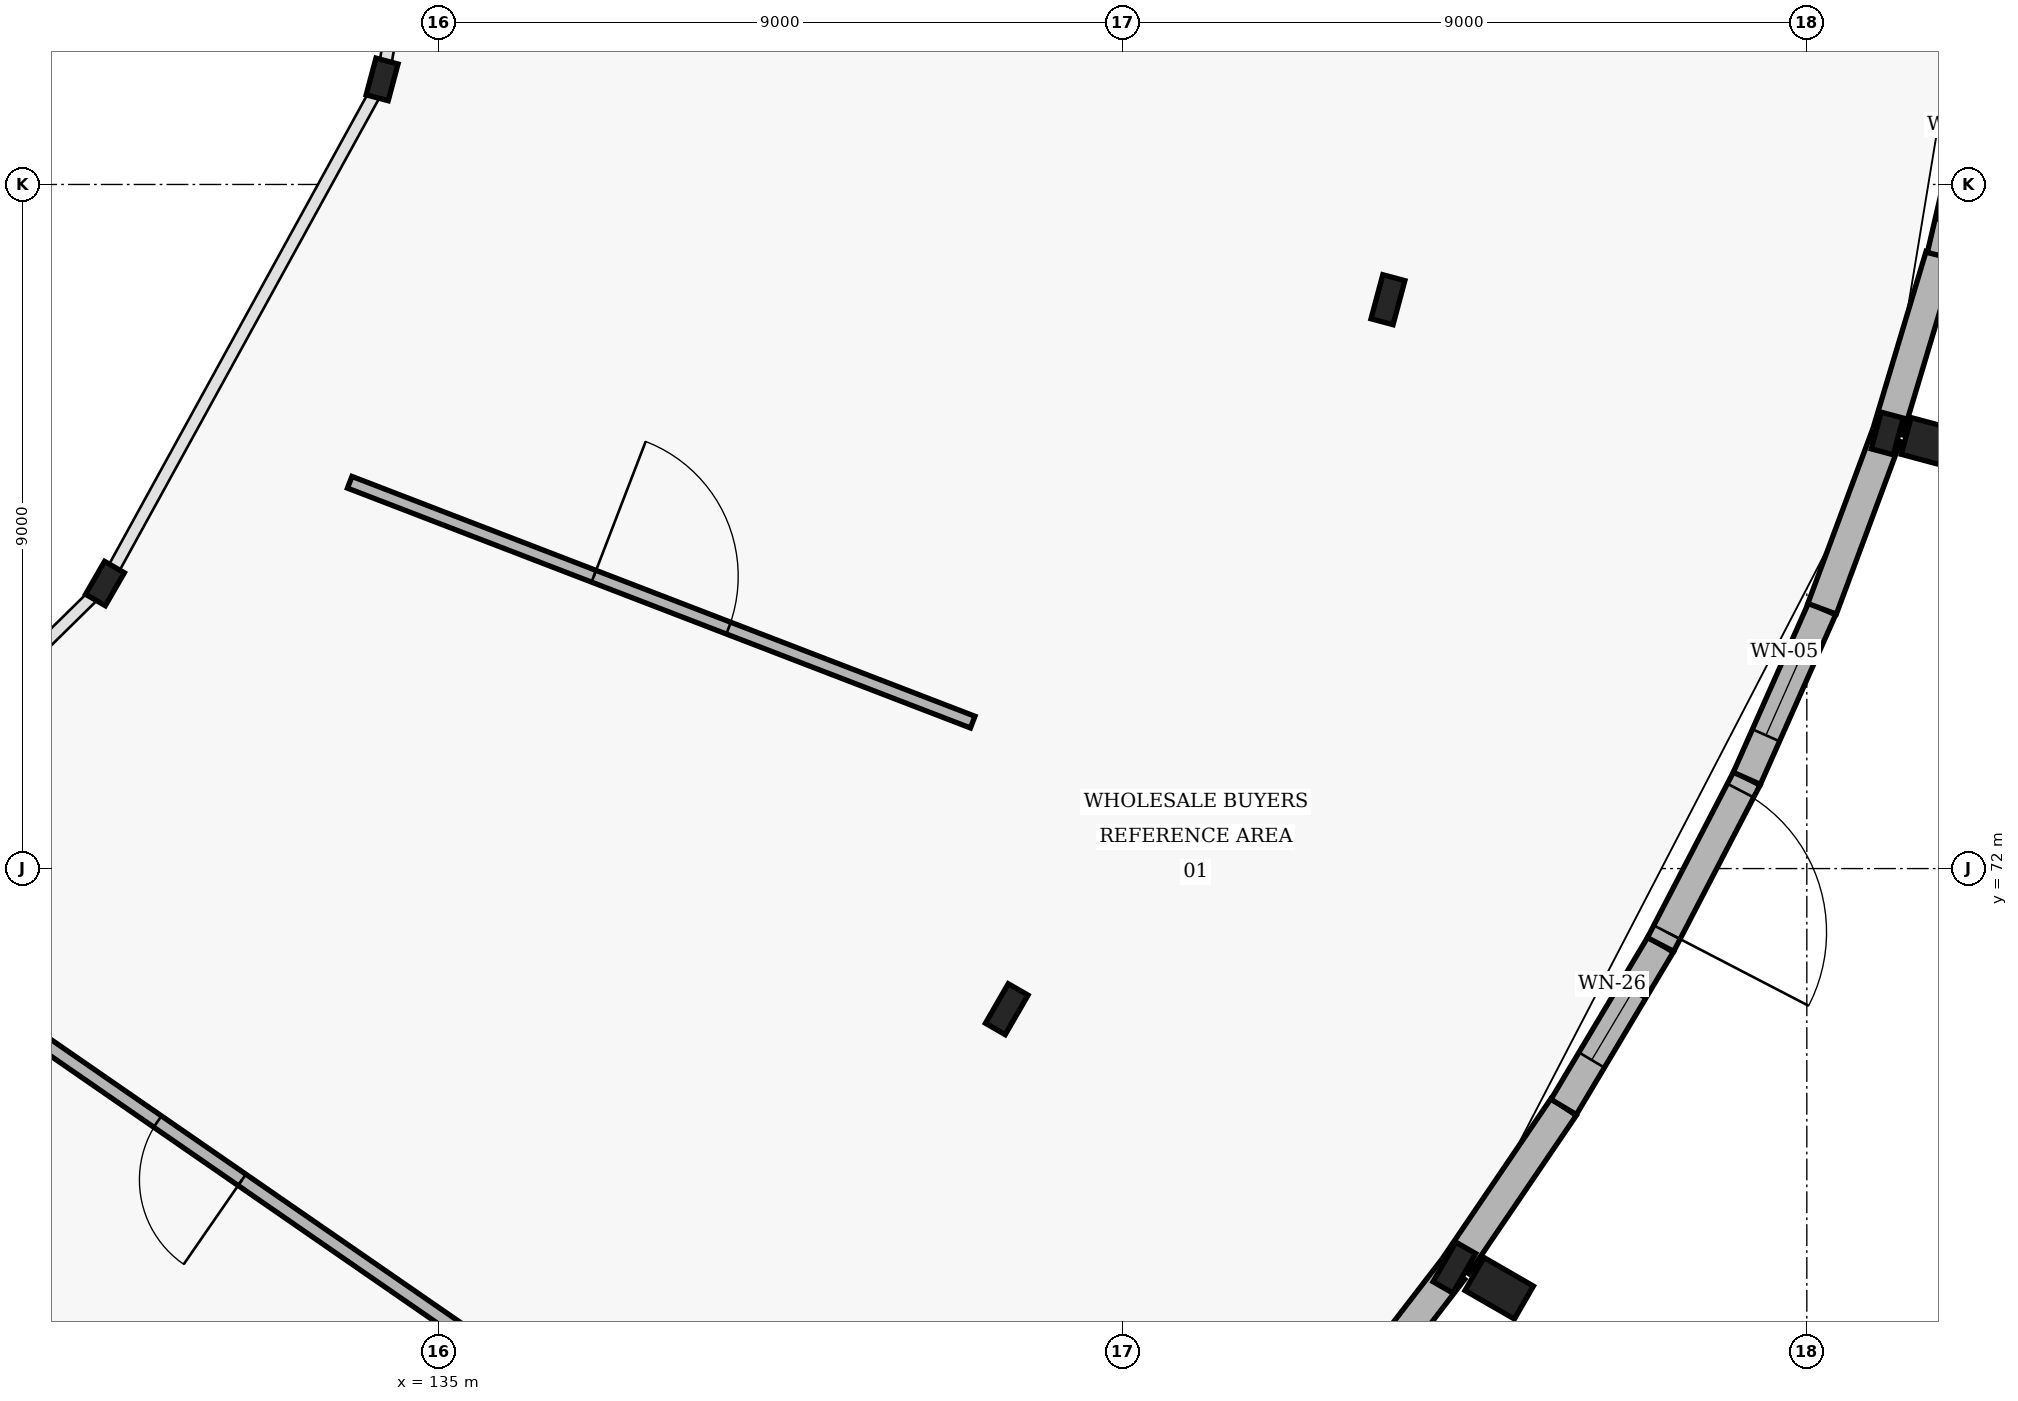
"""IFC4 building model, lengths in metres.
Left out: names, types, materials, properties, quantities, classifications, styles, units other than length and angle.
Written with IfcOpenShell. Run it as: python <this file> out.ifc"""

import sys

from ifc_helpers import new_model, si_unit, direction, frame, frame_2d, origin, origin_2d, place, context, subcontext, project, spatial, rectangle, i_section, extrude, element, fill, save


model = new_model("IFC4")
c1 = context("Model", 3, precision=1e-05, world=origin(), true_north=direction((0.0, 1.0)))
c2 = subcontext(c1, "Body", "Model", "MODEL_VIEW")
j1 = project(units=[si_unit("LENGTHUNIT", "METRE"), si_unit("PLANEANGLEUNIT", "RADIAN")], contexts=[c1])
p1 = place(None, origin())
s1 = spatial("IfcSite", under=j1, at=p1, CompositionType="ELEMENT")
p2 = place(p1, origin())
s2 = spatial("IfcBuilding", under=s1, at=p2, CompositionType="ELEMENT")
p3 = place(p2, origin())
s3 = spatial("IfcBuildingStorey", under=s2, at=p3, CompositionType="ELEMENT", Elevation=0.0)
p4 = place(p3, frame((130.61, 75.75, 0.0), z_axis=(0.0, 0.0, 1.0), x_axis=(0.866025403784, -0.5, 0.0)))
e1 = element("IfcColumn", 1, at=p4, inside=s3, PredefinedType="COLUMN", context=c2, shape_type="SweptSolid", body=[
    extrude(i_section(OverallWidth=0.3, OverallDepth=0.5, WebThickness=0.014, FlangeThickness=0.028, FilletRadius=0.027, at=origin_2d()), origin(), (0.0, 0.0, 1.0), 5.4),
])
for number, where, z_axis, x_axis in (
    (2, (142.474, 70.15, 0.0), (0.0, 0.0, 1.0), (0.866, -0.5, 0.0)),
    (3, (148.363, 66.75, 0.0), (0.0, 0.0, 1.0), (0.866, -0.5, 0.0)),
):
    element("IfcColumn", number, at=place(p3, frame(where, z_axis=z_axis, x_axis=x_axis)), inside=s3, PredefinedType="COLUMN", context=c2, shape_type="SweptSolid", body=[
        extrude(i_section(OverallWidth=0.3, OverallDepth=0.6, WebThickness=0.015, FlangeThickness=0.03, FilletRadius=0.027, at=origin_2d()), origin(), (0.0, 0.0, 1.0), 5.4),
    ])
p5 = place(p3, frame((148.953, 66.478, 0.0), z_axis=(0.0, 0.0, 1.0), x_axis=(0.866025403784, -0.5, 0.0)))
e4 = element("IfcColumn", 4, at=p5, inside=s3, PredefinedType="PILASTER", context=c2, shape_type="SweptSolid", body=[
    extrude(rectangle(XDim=0.75, YDim=0.5, at=origin_2d()), origin(), (0.0, 0.0, 1.0), 5.15),
])
p6 = place(p3, frame((134.256, 82.382, 0.0), z_axis=(0.0, 0.0, 1.0), x_axis=(0.965925826289, -0.258819045103, 0.0)))
e5 = element("IfcColumn", 5, at=p6, inside=s3, PredefinedType="COLUMN", context=c2, shape_type="SweptSolid", body=[
    extrude(i_section(OverallWidth=0.3, OverallDepth=0.5, WebThickness=0.014, FlangeThickness=0.028, FilletRadius=0.027, at=origin_2d()), origin(), (0.0, 0.0, 1.0), 5.4),
])
p7 = place(p3, frame((147.489, 79.484, 0.0), z_axis=(0.0, 0.0, 1.0), x_axis=(0.965925826289, -0.258819045103, 0.0)))
e6 = element("IfcColumn", 6, at=p7, inside=s3, PredefinedType="COLUMN", context=c2, shape_type="SweptSolid", body=[
    extrude(i_section(OverallWidth=0.3, OverallDepth=0.6, WebThickness=0.015, FlangeThickness=0.03, FilletRadius=0.027, at=origin_2d()), origin(), (0.0, 0.0, 1.0), 5.4),
])
p8 = place(p3, frame((154.058, 77.724, 0.0), z_axis=(0.0, 0.0, 1.0), x_axis=(0.965925826289, -0.258819045103, 0.0)))
e7 = element("IfcColumn", 7, at=p8, inside=s3, PredefinedType="COLUMN", context=c2, shape_type="SweptSolid", body=[
    extrude(i_section(OverallWidth=0.3, OverallDepth=0.5, WebThickness=0.014, FlangeThickness=0.028, FilletRadius=0.027, at=origin_2d()), origin(), (0.0, 0.0, 1.0), 5.4),
])
p9 = place(p3, frame((154.694, 77.588, 0.0), z_axis=(0.0, 0.0, 1.0), x_axis=(0.965925826289, -0.258819045103, 0.0)))
e8 = element("IfcColumn", 8, at=p9, inside=s3, PredefinedType="PILASTER", context=c2, shape_type="SweptSolid", body=[
    extrude(rectangle(XDim=0.8, YDim=0.5, at=origin_2d()), origin(), (0.0, 0.0, 1.0), 5.15),
])
p10 = place(p3, frame((146.789, 64.701, 0.0), z_axis=(0.0, 0.0, 1.0), x_axis=(0.609808109702, 0.792549095856, 0.0)))
e9 = element("IfcWall", 9, at=p10, inside=s3, PredefinedType="SOLIDWALL", context=c2, shape_type="SweptSolid", body=[
    extrude(rectangle(XDim=2.545, YDim=0.4, at=frame_2d((1.272, 0.0))), origin(), (0.0, 0.0, 1.0), 4.6),
])
p11 = place(p3, frame((148.388, 66.783, 0.0), z_axis=(0.0, 0.0, 1.0), x_axis=(0.561757719856, 0.827301797521, 0.0)))
e10 = element("IfcWall", 10, at=p11, inside=s3, PredefinedType="SOLIDWALL", context=c2, shape_type="SweptSolid", body=[
    extrude(rectangle(XDim=2.515, YDim=0.4, at=frame_2d((1.258, 0.0))), origin(), (0.0, 0.0, 1.0), 4.6),
])
p12 = place(p3, frame((149.801, 68.864, 0.0), z_axis=(0.0, 0.0, 1.0), x_axis=(0.512344316931, 0.858780123727, 0.0)))
e11 = element("IfcWall", 11, at=p12, inside=s3, PredefinedType="SOLIDWALL", context=c2, shape_type="SweptSolid", body=[
    extrude(rectangle(XDim=2.488, YDim=0.39, at=frame_2d((1.244, 0.0))), origin(), (0.0, 0.0, 1.0), 4.6),
])
p13 = place(p12, frame((0.719, 0.0, 0.95)))
e12 = element("IfcOpeningElement", 12, at=p13, cuts=e11, PredefinedType="OPENING", context=c2, shape_type="SweptSolid", body=[
    extrude(rectangle(XDim=1.05, YDim=1.35, at=frame_2d((0.525, 0.675))), frame((0.0, 0.205, 0.0), z_axis=(0.0, -1.0, 0.0), x_axis=(1.0, 0.0, 0.0)), (0.0, 0.0, 1.0), 0.41),
])
p14 = place(p3, frame((151.076, 71.001, 0.0), z_axis=(0.0, 0.0, 1.0), x_axis=(0.460800257055, 0.88750387216, 0.0)))
e13 = element("IfcWall", 13, at=p14, inside=s3, PredefinedType="SOLIDWALL", context=c2, shape_type="SweptSolid", body=[
    extrude(rectangle(XDim=2.463, YDim=0.39, at=frame_2d((1.231, 0.0))), origin(), (0.0, 0.0, 1.0), 4.6),
])
p15 = place(p14, frame((0.182, 0.0, 0.0)))
e14 = element("IfcOpeningElement", 14, at=p15, cuts=e13, PredefinedType="OPENING", context=c2, shape_type="SweptSolid", body=[
    extrude(rectangle(XDim=2.1, YDim=2.35, at=frame_2d((1.05, 1.175))), frame((0.0, 0.205, 0.0), z_axis=(0.0, -1.0, 0.0), x_axis=(1.0, 0.0, 0.0)), (0.0, 0.0, 1.0), 0.41),
])
p16 = place(p3, frame((152.211, 73.187, 0.0), z_axis=(0.0, 0.0, 1.0), x_axis=(0.405609389351, 0.914046510453, 0.0)))
e15 = element("IfcWall", 15, at=p16, inside=s3, PredefinedType="SOLIDWALL", context=c2, shape_type="SweptSolid", body=[
    extrude(rectangle(XDim=2.441, YDim=0.39, at=frame_2d((1.22, 0.0))), origin(), (0.0, 0.0, 1.0), 4.6),
])
p17 = place(p16, frame((0.62, 0.0, 0.95)))
e16 = element("IfcOpeningElement", 16, at=p17, cuts=e15, PredefinedType="OPENING", context=c2, shape_type="SweptSolid", body=[
    extrude(rectangle(XDim=1.2, YDim=1.8, at=frame_2d((0.6, 0.9))), frame((0.0, 0.205, 0.0), z_axis=(0.0, -1.0, 0.0), x_axis=(1.0, 0.0, 0.0)), (0.0, 0.0, 1.0), 0.41),
])
p18 = place(p3, frame((153.201, 75.418, 0.0), z_axis=(0.0, 0.0, 1.0), x_axis=(0.348624527721, 0.937262470534, 0.0)))
e17 = element("IfcWall", 17, at=p18, inside=s3, PredefinedType="SOLIDWALL", context=c2, shape_type="SweptSolid", body=[
    extrude(rectangle(XDim=2.421, YDim=0.4, at=frame_2d((1.21, 0.0))), origin(), (0.0, 0.0, 1.0), 4.6),
])
p19 = place(p3, frame((154.071, 77.762, 0.0), z_axis=(0.0, 0.0, 1.0), x_axis=(0.287208023904, 0.95786823259, 0.0)))
e18 = element("IfcWall", 18, at=p19, inside=s3, PredefinedType="SOLIDWALL", context=c2, shape_type="SweptSolid", body=[
    extrude(rectangle(XDim=2.402, YDim=0.4, at=frame_2d((1.201, 0.0))), origin(), (0.0, 0.0, 1.0), 4.6),
])
p20 = place(p3, frame((154.761, 80.063, 0.0), z_axis=(0.0, 0.0, 1.0), x_axis=(0.225688046165, 0.974199623187, 0.0)))
e19 = element("IfcWall", 19, at=p20, inside=s3, PredefinedType="SOLIDWALL", context=c2, shape_type="SweptSolid", body=[
    extrude(rectangle(XDim=2.388, YDim=0.36, at=frame_2d((1.194, 0.0))), origin(), (0.0, 0.0, 1.0), 4.6),
])
p21 = place(p20, frame((0.444, 0.0, 0.95)))
e20 = element("IfcOpeningElement", 20, at=p21, cuts=e19, PredefinedType="OPENING", context=c2, shape_type="SweptSolid", body=[
    extrude(rectangle(XDim=1.5, YDim=2.1, at=frame_2d((0.75, 1.05))), frame((0.0, 0.19, 0.0), z_axis=(0.0, -1.0, 0.0), x_axis=(1.0, 0.0, 0.0)), (0.0, 0.0, 1.0), 0.38),
])
p22 = place(p3, frame((128.475, 70.626, 0.0), z_axis=(0.0, 0.0, 1.0), x_axis=(0.822666462931, -0.568524309743, 0.0)))
e21 = element("IfcWall", 21, at=p22, inside=s3, PredefinedType="PARTITIONING", context=c2, shape_type="SweptSolid", body=[
    extrude(rectangle(XDim=8.223, YDim=0.18, at=frame_2d((4.112, 0.0))), origin(), (0.0, 0.0, 1.0), 4.3),
])
p23 = place(p22, frame((3.437, 0.0, 0.0)))
e22 = element("IfcOpeningElement", 22, at=p23, cuts=e21, PredefinedType="OPENING", context=c2, shape_type="SweptSolid", body=[
    extrude(rectangle(XDim=1.35, YDim=2.2, at=frame_2d((0.675, 1.1))), frame((0.0, 0.1, 0.0), z_axis=(0.0, -1.0, 0.0), x_axis=(1.0, 0.0, 0.0)), (0.0, 0.0, 1.0), 0.2),
])
p24 = place(p3, frame((133.83, 77.082, 0.0), z_axis=(0.0, 0.0, 1.0), x_axis=(0.933238808021, -0.359256631399, 0.0)))
e23 = element("IfcWall", 23, at=p24, inside=s3, PredefinedType="PARTITIONING", context=c2, shape_type="SweptSolid", body=[
    extrude(rectangle(XDim=8.782, YDim=0.165, at=frame_2d((4.391, 0.0))), origin(), (0.0, 0.0, 1.0), 4.3),
])
p25 = place(p24, frame((3.441, 0.0, 0.0)))
e24 = element("IfcOpeningElement", 24, at=p25, cuts=e23, PredefinedType="OPENING", context=c2, shape_type="SweptSolid", body=[
    extrude(rectangle(XDim=1.9, YDim=2.35, at=frame_2d((0.95, 1.175))), frame((0.0, 0.093, 0.0), z_axis=(0.0, -1.0, 0.0), x_axis=(1.0, 0.0, 0.0)), (0.0, 0.0, 1.0), 0.185),
])
p26 = place(p13, origin())
e25 = element("IfcWindow", 25, at=p26, inside=s3, PartitioningType="SINGLE_PANEL", PredefinedType="WINDOW", context=c2, shape_type="SweptSolid", body=[
    extrude(rectangle(XDim=1.05, YDim=1.35, at=frame_2d((0.525, 0.675))), frame((0.0, 0.03, 0.0), z_axis=(0.0, -1.0, 0.0), x_axis=(1.0, 0.0, 0.0)), (0.0, 0.0, 1.0), 0.06),
])
fill(e12, e25)
p27 = place(p15, frame((2.1, 0.0, 0.0), z_axis=(0.0, 0.0, 1.0), x_axis=(-1.0, 0.0, 0.0)))
e26 = element("IfcDoor", 26, at=p27, inside=s3, OperationType="DOUBLE_DOOR_SINGLE_SWING", PredefinedType="DOOR", context=c2, shape_type="SweptSolid", body=[
    extrude(rectangle(XDim=2.1, YDim=2.35, at=frame_2d((1.05, 1.175))), frame((0.0, 0.025, 0.0), z_axis=(0.0, -1.0, 0.0), x_axis=(1.0, 0.0, 0.0)), (0.0, 0.0, 1.0), 0.05),
])
fill(e14, e26)
p28 = place(p17, origin())
e27 = element("IfcWindow", 27, at=p28, inside=s3, PartitioningType="SINGLE_PANEL", PredefinedType="WINDOW", context=c2, shape_type="SweptSolid", body=[
    extrude(rectangle(XDim=1.2, YDim=1.8, at=frame_2d((0.6, 0.9))), frame((0.0, 0.03, 0.0), z_axis=(0.0, -1.0, 0.0), x_axis=(1.0, 0.0, 0.0)), (0.0, 0.0, 1.0), 0.06),
])
fill(e16, e27)
p29 = place(p23, origin())
e28 = element("IfcDoor", 28, at=p29, inside=s3, OperationType="SINGLE_SWING_RIGHT", PredefinedType="DOOR", context=c2, shape_type="SweptSolid", body=[
    extrude(rectangle(XDim=1.35, YDim=2.2, at=frame_2d((0.675, 1.1))), frame((0.0, 0.025, 0.0), z_axis=(0.0, -1.0, 0.0), x_axis=(1.0, 0.0, 0.0)), (0.0, 0.0, 1.0), 0.05),
])
fill(e22, e28)
p30 = place(p25, origin())
e29 = element("IfcDoor", 29, at=p30, inside=s3, OperationType="DOUBLE_DOOR_SINGLE_SWING", PredefinedType="DOOR", context=c2, shape_type="SweptSolid", body=[
    extrude(rectangle(XDim=1.9, YDim=2.35, at=frame_2d((0.95, 1.175))), frame((0.0, 0.025, 0.0), z_axis=(0.0, -1.0, 0.0), x_axis=(1.0, 0.0, 0.0)), (0.0, 0.0, 1.0), 0.05),
])
fill(e24, e29)
save(model, sys.argv[1])
